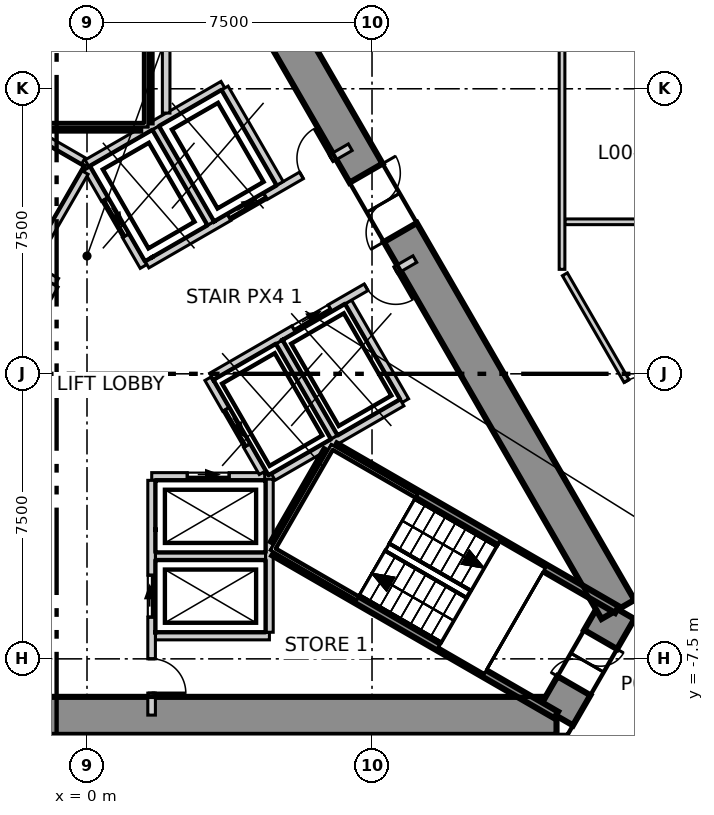
"""IFC4 building model, lengths in metres.
Left out: names, types, materials, properties, quantities, classifications, styles, units other than length and angle.
Written with IfcOpenShell. Run it as: python <this file> out.ifc"""

import sys

from ifc_helpers import new_model, si_unit, direction, frame, frame_2d, origin, place, context, subcontext, project, spatial, polyline, rectangle, outline, extrude, element, fill, save


model = new_model("IFC4")
c1 = context("Model", 3, precision=1e-05, world=origin(), true_north=direction((0.0, 1.0)))
c2 = subcontext(c1, "Body", "Model", "MODEL_VIEW")
j1 = project(units=[si_unit("LENGTHUNIT", "METRE"), si_unit("PLANEANGLEUNIT", "RADIAN")], contexts=[c1])
p1 = place(None, origin())
s1 = spatial("IfcSite", under=j1, at=p1, CompositionType="ELEMENT")
p2 = place(p1, origin())
s2 = spatial("IfcBuilding", under=s1, at=p2, CompositionType="ELEMENT")
p3 = place(p2, origin())
s3 = spatial("IfcBuildingStorey", under=s2, at=p3, CompositionType="ELEMENT", Elevation=0.0)
p4 = place(p3, frame((-12.355, -9.0, -0.4), z_axis=(0.0, 0.0, 1.0), x_axis=(1.0, 0.0, 0.0)))
e1 = element("IfcWall", 1, at=p4, inside=s3, PredefinedType="SHEAR", context=c2, shape_type="SweptSolid", body=[
    extrude(outline(polyline([(-0.289, -0.5), (1.656, -0.5), (3.601, -0.5), (5.547, -0.5), (7.492, -0.5), (9.437, -0.5), (11.382, -0.5), (13.328, -0.5), (15.273, -0.5), (17.218, -0.5), (19.163, -0.5), (21.109, -0.5), (23.054, -0.5), (24.999, -0.5), (24.422, 0.5), (22.566, 0.5), (20.709, 0.5), (18.853, 0.5), (16.996, 0.5), (15.14, 0.5), (13.283, 0.5), (11.427, 0.5), (9.57, 0.5), (7.714, 0.5), (5.857, 0.5), (4.001, 0.5), (2.145, 0.5), (0.288, 0.5), (-0.289, -0.5)])), origin(), (0.0, 0.0, 1.0), 8.5),
])
p5 = place(p3, frame((12.355, -9.0, -0.4), z_axis=(0.0, 0.0, 1.0), x_axis=(0.500077567175, 0.865980615723, 0.0)))
e2 = element("IfcWall", 2, at=p5, inside=s3, PredefinedType="SHEAR", context=c2, shape_type="SweptSolid", body=[
    extrude(outline(polyline([(-0.288, -0.5), (1.617, -0.5), (3.522, -0.5), (2.945, 0.5), (1.617, 0.5), (0.289, 0.499), (-0.288, -0.5)])), origin(), (0.0, 0.0, 1.0), 8.5),
])
p6 = place(p5, frame((0.917, 0.0, 0.4)))
e3 = element("IfcOpeningElement", 3, at=p6, cuts=e2, PredefinedType="OPENING", context=c2, shape_type="SweptSolid", body=[
    extrude(rectangle(XDim=1.4, YDim=2.1, at=frame_2d((0.7, 1.05))), frame((0.0, 0.51, 0.0), z_axis=(0.0, -1.0, 0.0), x_axis=(1.0, 0.0, 0.0)), (0.0, 0.0, 1.0), 1.02),
])
p7 = place(p3, frame((13.972, -6.2, -0.4), z_axis=(0.0, 0.0, 1.0), x_axis=(-0.499992141631, 0.866029940768, 0.0)))
e4 = element("IfcWall", 4, at=p7, inside=s3, PredefinedType="SHEAR", context=c2, shape_type="SweptSolid", body=[
    extrude(outline(polyline([(-0.288, -0.5), (1.657, -0.5), (3.602, -0.5), (5.547, -0.5), (7.493, -0.5), (9.438, -0.5), (11.383, -0.5), (13.328, -0.5), (15.273, -0.5), (17.218, -0.499), (19.164, -0.499), (21.109, -0.499), (23.054, -0.499), (24.999, -0.499), (24.422, 0.5), (22.566, 0.5), (20.709, 0.5), (18.853, 0.5), (16.996, 0.5), (15.14, 0.5), (13.283, 0.5), (11.427, 0.5), (9.57, 0.5), (7.714, 0.5), (5.857, 0.5), (4.001, 0.5), (2.145, 0.5), (0.288, 0.5), (-0.288, -0.5)])), origin(), (0.0, 0.0, 1.0), 8.5),
])
p8 = place(p7, frame((11.455, 0.0, 0.4)))
e5 = element("IfcOpeningElement", 5, at=p8, cuts=e4, PredefinedType="OPENING", context=c2, shape_type="SweptSolid", body=[
    extrude(rectangle(XDim=1.8, YDim=2.1, at=frame_2d((0.9, 1.05))), frame((0.0, 0.51, 0.0), z_axis=(0.0, -1.0, 0.0), x_axis=(1.0, 0.0, 0.0)), (0.0, 0.0, 1.0), 1.02),
])
p9 = place(p3, frame((12.575, 4.0, 0.0), z_axis=(0.0, 0.0, 1.0), x_axis=(1.0, 0.0, 0.0)))
e6 = element("IfcWall", 6, at=p9, inside=s3, PredefinedType="PARTITIONING", context=c2, shape_type="SweptSolid", body=[
    extrude(rectangle(XDim=5.583, YDim=0.15, at=frame_2d((2.792, 0.0))), origin(), (0.0, 0.0, 1.0), 8.1),
])
p10 = place(p3, frame((12.5, 2.749, 0.0), z_axis=(0.0, 0.0, 1.0), x_axis=(0.0, 1.0, 0.0)))
e7 = element("IfcWall", 7, at=p10, inside=s3, PredefinedType="PARTITIONING", context=c2, shape_type="SweptSolid", body=[
    extrude(rectangle(XDim=11.2, YDim=0.15, at=frame_2d((5.6, 0.0))), origin(), (0.0, 0.0, 1.0), 8.1),
])
p11 = place(p3, frame((13.625, 12.0, 0.0), z_axis=(0.0, 0.0, 1.0), x_axis=(0.500026956598, -0.866009839826, 0.0)))
e8 = element("IfcWall", 8, at=p11, inside=s3, PredefinedType="PARTITIONING", context=c2, shape_type="SweptSolid", body=[
    extrude(rectangle(XDim=16.749, YDim=0.15, at=frame_2d((8.375, 0.0))), origin(), (0.0, 0.0, 1.0), 8.1),
])
p12 = place(p11, frame((4.119, 0.0, 0.0)))
e9 = element("IfcOpeningElement", 9, at=p12, cuts=e8, PredefinedType="OPENING", context=c2, shape_type="SweptSolid", body=[
    extrude(rectangle(XDim=1.0, YDim=2.1, at=frame_2d((0.5, 1.05))), frame((0.0, 0.085, 0.0), z_axis=(0.0, -1.0, 0.0), x_axis=(1.0, 0.0, 0.0)), (0.0, 0.0, 1.0), 0.17),
])
p13 = place(p3, frame((12.575, 2.619, 0.0), z_axis=(0.0, 0.0, 1.0), x_axis=(0.499992812315, -0.866029553557, 0.0)))
e10 = element("IfcWall", 10, at=p13, inside=s3, PredefinedType="PARTITIONING", context=c2, shape_type="SweptSolid", body=[
    extrude(rectangle(XDim=7.556, YDim=0.15, at=frame_2d((3.778, 0.0))), origin(), (0.0, 0.0, 1.0), 8.1),
])
p14 = place(p13, frame((3.246, 0.0, 0.0)))
e11 = element("IfcOpeningElement", 11, at=p14, cuts=e10, PredefinedType="OPENING", context=c2, shape_type="SweptSolid", body=[
    extrude(rectangle(XDim=1.0, YDim=2.1, at=frame_2d((0.5, 1.05))), frame((0.0, 0.085, 0.0), z_axis=(0.0, -1.0, 0.0), x_axis=(1.0, 0.0, 0.0)), (0.0, 0.0, 1.0), 0.17),
])
p15 = place(p3, frame((1.8, -6.9, 0.0), z_axis=(0.0, 0.0, 1.0), x_axis=(1.0, 0.0, 0.0)))
e12 = element("IfcWall", 12, at=p15, inside=s3, PredefinedType="SOLIDWALL", context=c2, shape_type="SweptSolid", body=[
    extrude(rectangle(XDim=3.0, YDim=0.2, at=frame_2d((1.5, 0.0))), origin(), (0.0, 0.0, 1.0), 8.1),
])
p16 = place(p3, frame((1.8, -4.8, 0.0), z_axis=(0.0, 0.0, 1.0), x_axis=(1.0, 0.0, 0.0)))
e13 = element("IfcWall", 13, at=p16, inside=s3, PredefinedType="SOLIDWALL", context=c2, shape_type="SweptSolid", body=[
    extrude(rectangle(XDim=2.9, YDim=0.2, at=frame_2d((1.45, 0.0))), origin(), (0.0, 0.0, 1.0), 8.1),
])
p17 = place(p3, frame((1.703, -2.7, 0.0), z_axis=(0.0, 0.0, 1.0), x_axis=(1.0, 0.0, 0.0)))
e14 = element("IfcWall", 14, at=p17, inside=s3, PredefinedType="SOLIDWALL", context=c2, shape_type="SweptSolid", body=[
    extrude(rectangle(XDim=2.973, YDim=0.2, at=frame_2d((1.487, 0.0))), origin(), (0.0, 0.0, 1.0), 8.1),
])
p18 = place(p17, frame((0.936, 0.0, 0.0)))
e15 = element("IfcOpeningElement", 15, at=p18, cuts=e14, PredefinedType="OPENING", context=c2, shape_type="SweptSolid", body=[
    extrude(rectangle(XDim=1.1, YDim=2.1, at=frame_2d((0.55, 1.05))), frame((0.0, 0.11, 0.0), z_axis=(0.0, -1.0, 0.0), x_axis=(1.0, 0.0, 0.0)), (0.0, 0.0, 1.0), 0.22),
])
p19 = place(p3, frame((-0.002, 5.541, 0.0), z_axis=(0.0, 0.0, 1.0), x_axis=(0.86600155993, 0.500041296494, 0.0)))
e16 = element("IfcWall", 16, at=p19, inside=s3, PredefinedType="SOLIDWALL", context=c2, shape_type="SweptSolid", body=[
    extrude(rectangle(XDim=4.132, YDim=0.2, at=frame_2d((2.066, 0.0))), origin(), (0.0, 0.0, 1.0), 8.1),
])
p20 = place(p3, frame((0.0, 5.4, 0.0), z_axis=(0.0, 0.0, 1.0), x_axis=(0.500103862429, -0.865965430478, 0.0)))
e17 = element("IfcWall", 17, at=p20, inside=s3, PredefinedType="SOLIDWALL", context=c2, shape_type="SweptSolid", body=[
    extrude(rectangle(XDim=2.973, YDim=0.2, at=frame_2d((1.487, 0.0))), origin(), (0.0, 0.0, 1.0), 8.1),
])
p21 = place(p20, frame((0.937, 0.0, 0.0)))
e18 = element("IfcOpeningElement", 18, at=p21, cuts=e17, PredefinedType="OPENING", context=c2, shape_type="SweptSolid", body=[
    extrude(rectangle(XDim=1.1, YDim=2.1, at=frame_2d((0.55, 1.05))), frame((0.0, 0.11, 0.0), z_axis=(0.0, -1.0, 0.0), x_axis=(1.0, 0.0, 0.0)), (0.0, 0.0, 1.0), 0.22),
])
p22 = place(p3, frame((3.19, -0.125, 0.0), z_axis=(0.0, 0.0, 1.0), x_axis=(0.499988658015, -0.866031951983, 0.0)))
e19 = element("IfcWall", 19, at=p22, inside=s3, PredefinedType="SOLIDWALL", context=c2, shape_type="SweptSolid", body=[
    extrude(rectangle(XDim=2.858, YDim=0.2, at=frame_2d((1.429, 0.0))), origin(), (0.0, 0.0, 1.0), 8.1),
])
p23 = place(p22, frame((0.936, 0.0, 0.0)))
e20 = element("IfcOpeningElement", 20, at=p23, cuts=e19, PredefinedType="OPENING", context=c2, shape_type="SweptSolid", body=[
    extrude(rectangle(XDim=1.1, YDim=2.1, at=frame_2d((0.55, 1.05))), frame((0.0, 0.11, 0.0), z_axis=(0.0, -1.0, 0.0), x_axis=(1.0, 0.0, 0.0)), (0.0, 0.0, 1.0), 0.22),
])
p24 = place(p3, frame((1.578, 2.874, 0.0), z_axis=(0.0, 0.0, 1.0), x_axis=(0.866055259465, 0.499948284879, 0.0)))
e21 = element("IfcWall", 21, at=p24, inside=s3, PredefinedType="SOLIDWALL", context=c2, shape_type="SweptSolid", body=[
    extrude(rectangle(XDim=6.177, YDim=0.2, at=frame_2d((3.088, 0.0))), origin(), (0.0, 0.0, 1.0), 8.1),
])
p25 = place(p24, frame((2.496, 0.0, 0.0)))
e22 = element("IfcOpeningElement", 22, at=p25, cuts=e21, PredefinedType="OPENING", context=c2, shape_type="SweptSolid", body=[
    extrude(rectangle(XDim=1.1, YDim=2.1, at=frame_2d((0.55, 1.05))), frame((0.0, 0.11, 0.0), z_axis=(0.0, -1.0, 0.0), x_axis=(1.0, 0.0, 0.0)), (0.0, 0.0, 1.0), 0.22),
])
p26 = place(p24, frame((4.696, 0.0, 0.0)))
e23 = element("IfcOpeningElement", 23, at=p26, cuts=e21, PredefinedType="OPENING", context=c2, shape_type="SweptSolid", body=[
    extrude(rectangle(XDim=0.9, YDim=2.1, at=frame_2d((0.45, 1.05))), frame((0.0, 0.11, 0.0), z_axis=(0.0, -1.0, 0.0), x_axis=(1.0, 0.0, 0.0)), (0.0, 0.0, 1.0), 0.22),
])
p27 = place(p3, frame((1.7, -8.98, 0.0), z_axis=(0.0, 0.0, 1.0), x_axis=(0.0, 1.0, 0.0)))
e24 = element("IfcWall", 24, at=p27, inside=s3, PredefinedType="SOLIDWALL", context=c2, shape_type="SweptSolid", body=[
    extrude(rectangle(XDim=6.177, YDim=0.2, at=frame_2d((3.088, 0.0))), origin(), (0.0, 0.0, 1.0), 8.1),
])
p28 = place(p27, frame((2.58, 0.0, 0.0)))
e25 = element("IfcOpeningElement", 25, at=p28, cuts=e24, PredefinedType="OPENING", context=c2, shape_type="SweptSolid", body=[
    extrude(rectangle(XDim=1.1, YDim=2.1, at=frame_2d((0.55, 1.05))), frame((0.0, 0.11, 0.0), z_axis=(0.0, -1.0, 0.0), x_axis=(1.0, 0.0, 0.0)), (0.0, 0.0, 1.0), 0.22),
])
p29 = place(p27, frame((0.58, 0.0, 0.0)))
e26 = element("IfcOpeningElement", 26, at=p29, cuts=e24, PredefinedType="OPENING", context=c2, shape_type="SweptSolid", body=[
    extrude(rectangle(XDim=0.9, YDim=2.1, at=frame_2d((0.45, 1.05))), frame((0.0, 0.11, 0.0), z_axis=(0.0, -1.0, 0.0), x_axis=(1.0, 0.0, 0.0)), (0.0, 0.0, 1.0), 0.22),
])
p30 = place(p3, frame((4.8, -6.8, 0.0), z_axis=(0.0, 0.0, 1.0), x_axis=(0.0, 1.0, 0.0)))
e27 = element("IfcWall", 27, at=p30, inside=s3, PredefinedType="SOLIDWALL", context=c2, shape_type="SweptSolid", body=[
    extrude(rectangle(XDim=4.029, YDim=0.2, at=frame_2d((2.015, 0.0))), origin(), (0.0, 0.0, 1.0), 8.1),
])
for number, where, z_axis, x_axis in (
    (28, (1.807, 6.47, 0.0), (0.0, 0.0, 1.0), (0.5, -0.866, 0.0)),
    (29, (5.057, 0.841, 0.0), (0.0, 0.0, 1.0), (0.5, -0.866, 0.0)),
    (30, (3.626, 7.52, 0.0), (0.0, 0.0, 1.0), (0.5, -0.866, 0.0)),
):
    element("IfcWall", number, at=place(p3, frame(where, z_axis=z_axis, x_axis=x_axis)), inside=s3, PredefinedType="SOLIDWALL", context=c2, shape_type="SweptSolid", body=[
        extrude(rectangle(XDim=2.9, YDim=0.2, at=frame_2d((1.45, 0.0))), origin(), (0.0, 0.0, 1.0), 8.1),
    ])
p31 = place(p3, frame((6.876, 1.891, 0.0), z_axis=(0.0, 0.0, 1.0), x_axis=(0.499990139034, -0.866031096941, 0.0)))
e31 = element("IfcWall", 31, at=p31, inside=s3, PredefinedType="SOLIDWALL", context=c2, shape_type="SweptSolid", body=[
    extrude(rectangle(XDim=3.0, YDim=0.2, at=frame_2d((1.5, 0.0))), origin(), (0.0, 0.0, 1.0), 8.1),
])
p32 = place(p3, frame((3.278, -0.071, 0.0), z_axis=(0.0, 0.0, 1.0), x_axis=(0.865959795517, 0.500113619639, 0.0)))
e32 = element("IfcWall", 32, at=p32, inside=s3, PredefinedType="SOLIDWALL", context=c2, shape_type="SweptSolid", body=[
    extrude(rectangle(XDim=6.177, YDim=0.2, at=frame_2d((3.088, 0.0))), origin(), (0.0, 0.0, 1.0), 8.1),
])
p33 = place(p32, frame((2.497, 0.0, 0.0)))
e33 = element("IfcOpeningElement", 33, at=p33, cuts=e32, PredefinedType="OPENING", context=c2, shape_type="SweptSolid", body=[
    extrude(rectangle(XDim=1.1, YDim=2.1, at=frame_2d((0.55, 1.05))), frame((0.0, 0.11, 0.0), z_axis=(0.0, -1.0, 0.0), x_axis=(1.0, 0.0, 0.0)), (0.0, 0.0, 1.0), 0.22),
])
p34 = place(p32, frame((4.697, 0.0, 0.0)))
e34 = element("IfcOpeningElement", 34, at=p34, cuts=e32, PredefinedType="OPENING", context=c2, shape_type="SweptSolid", body=[
    extrude(rectangle(XDim=0.9, YDim=2.1, at=frame_2d((0.45, 1.05))), frame((0.0, 0.11, 0.0), z_axis=(0.0, -1.0, 0.0), x_axis=(1.0, 0.0, 0.0)), (0.0, 0.0, 1.0), 0.22),
])
p35 = place(p3, frame((4.9, -2.714, 0.0), z_axis=(0.0, 0.0, 1.0), x_axis=(0.865992350556, 0.500057245502, 0.0)))
e35 = element("IfcWall", 35, at=p35, inside=s3, PredefinedType="SOLIDWALL", context=c2, shape_type="SweptSolid", body=[
    extrude(rectangle(XDim=3.914, YDim=0.2, at=frame_2d((1.957, 0.0))), origin(), (0.0, 0.0, 1.0), 8.1),
])
p36 = place(p3, frame((-1.488, 2.822, 0.0), z_axis=(0.0, 0.0, 1.0), x_axis=(0.866236612152, -0.499633997809, 0.0)))
e36 = element("IfcWall", 36, at=p36, inside=s3, PredefinedType="SOLIDWALL", context=c2, shape_type="SweptSolid", body=[
    extrude(rectangle(XDim=0.796, YDim=0.2, at=frame_2d((0.398, 0.0))), origin(), (0.0, 0.0, 1.0), 8.1),
])
p37 = place(p3, frame((-2.444, -0.433, 0.0), z_axis=(0.0, 0.0, 1.0), x_axis=(0.500035624827, 0.866004834804, 0.0)))
e37 = element("IfcWall", 37, at=p37, inside=s3, PredefinedType="SOLIDWALL", context=c2, shape_type="SweptSolid", body=[
    extrude(rectangle(XDim=3.194, YDim=0.2, at=frame_2d((1.597, 0.0))), origin(), (0.0, 0.0, 1.0), 8.1),
])
p38 = place(p3, frame((-1.67, 6.507, 0.0), z_axis=(0.0, 0.0, 1.0), x_axis=(0.865941441609, -0.500145398563, 0.0)))
e38 = element("IfcWall", 38, at=p38, inside=s3, PredefinedType="SOLIDWALL", context=c2, shape_type="SweptSolid", body=[
    extrude(rectangle(XDim=1.815, YDim=0.2, at=frame_2d((0.908, 0.0))), origin(), (0.0, 0.0, 1.0), 8.1),
])
p39 = place(p3, frame((-1.438, 2.909, 0.0), z_axis=(0.0, 0.0, 1.0), x_axis=(0.499829630636, 0.866123744241, 0.0)))
e39 = element("IfcWall", 39, at=p39, inside=s3, PredefinedType="SOLIDWALL", context=c2, shape_type="SweptSolid", body=[
    extrude(rectangle(XDim=2.761, YDim=0.2, at=frame_2d((1.38, 0.0))), origin(), (0.0, 0.0, 1.0), 8.1),
])
p40 = place(p3, frame((2.083, 6.861, 0.0), z_axis=(0.0, 0.0, 1.0), x_axis=(0.0, 1.0, 0.0)))
e40 = element("IfcWall", 40, at=p40, inside=s3, PredefinedType="SOLIDWALL", context=c2, shape_type="SweptSolid", body=[
    extrude(rectangle(XDim=7.491, YDim=0.2, at=frame_2d((3.746, 0.0))), origin(), (0.0, 0.0, 1.0), 8.1),
])
p41 = place(p3, frame((1.6, 6.615, 0.0), z_axis=(0.0, 0.0, 1.0), x_axis=(0.0, 1.0, 0.0)))
e41 = element("IfcWall", 41, at=p41, inside=s3, PredefinedType="SOLIDWALL", context=c2, shape_type="SweptSolid", body=[
    extrude(rectangle(XDim=8.565, YDim=0.2, at=frame_2d((4.282, 0.0))), origin(), (0.0, 0.0, 1.0), 8.1),
])
p42 = place(p3, frame((-1.4, 6.5, 0.0), z_axis=(0.0, 0.0, 1.0), x_axis=(1.0, 0.0, 0.0)))
e42 = element("IfcWall", 42, at=p42, inside=s3, PredefinedType="SOLIDWALL", context=c2, shape_type="SweptSolid", body=[
    extrude(rectangle(XDim=2.8, YDim=0.2, at=frame_2d((1.4, 0.0))), origin(), (0.0, 0.0, 1.0), 8.1),
])
p43 = place(p3, frame((4.929, -4.462, 0.0), z_axis=(0.0, 0.0, 1.0), x_axis=(0.500200581029, 0.865909567298, 0.0)))
e43 = element("IfcWall", 43, at=p43, inside=s3, PredefinedType="SOLIDWALL", context=c2, shape_type="SweptSolid", body=[
    extrude(rectangle(XDim=2.799, YDim=0.2, at=frame_2d((1.399, 0.0))), origin(), (0.0, 0.0, 1.0), 8.1),
])
p44 = place(p3, frame((6.529, -1.922, 0.0), z_axis=(0.0, 0.0, 1.0), x_axis=(0.866036527536, -0.499980732602, 0.0)))
e44 = element("IfcWall", 44, at=p44, inside=s3, PredefinedType="SOLIDWALL", context=c2, shape_type="SweptSolid", body=[
    extrude(rectangle(XDim=8.564, YDim=0.2, at=frame_2d((4.282, 0.0))), origin(), (0.0, 0.0, 1.0), 8.1),
])
p45 = place(p3, frame((4.929, -4.693, 0.0), z_axis=(0.0, 0.0, 1.0), x_axis=(0.865987152174, -0.50006624788, 0.0)))
e45 = element("IfcWall", 45, at=p45, inside=s3, PredefinedType="SOLIDWALL", context=c2, shape_type="SweptSolid", body=[
    extrude(rectangle(XDim=8.565, YDim=0.2, at=frame_2d((4.282, 0.0))), origin(), (0.0, 0.0, 1.0), 8.1),
])
p46 = place(p18, origin())
e46 = element("IfcDoor", 46, at=p46, inside=s3, OperationType="SLIDING_TO_LEFT", PredefinedType="DOOR", context=c2, shape_type="SweptSolid", body=[
    extrude(rectangle(XDim=1.1, YDim=2.1, at=frame_2d((0.55, 1.05))), frame((0.0, 0.025, 0.0), z_axis=(0.0, -1.0, 0.0), x_axis=(1.0, 0.0, 0.0)), (0.0, 0.0, 1.0), 0.05),
])
fill(e15, e46)
p47 = place(p28, origin())
e47 = element("IfcDoor", 47, at=p47, inside=s3, OperationType="SLIDING_TO_LEFT", PredefinedType="DOOR", context=c2, shape_type="SweptSolid", body=[
    extrude(rectangle(XDim=1.1, YDim=2.1, at=frame_2d((0.55, 1.05))), frame((0.0, 0.025, 0.0), z_axis=(0.0, -1.0, 0.0), x_axis=(1.0, 0.0, 0.0)), (0.0, 0.0, 1.0), 0.05),
])
fill(e25, e47)
p48 = place(p21, origin())
e48 = element("IfcDoor", 48, at=p48, inside=s3, OperationType="SLIDING_TO_LEFT", PredefinedType="DOOR", context=c2, shape_type="SweptSolid", body=[
    extrude(rectangle(XDim=1.1, YDim=2.1, at=frame_2d((0.55, 1.05))), frame((0.0, 0.025, 0.0), z_axis=(0.0, -1.0, 0.0), x_axis=(1.0, 0.0, 0.0)), (0.0, 0.0, 1.0), 0.05),
])
fill(e18, e48)
p49 = place(p25, origin())
e49 = element("IfcDoor", 49, at=p49, inside=s3, OperationType="SLIDING_TO_LEFT", PredefinedType="DOOR", context=c2, shape_type="SweptSolid", body=[
    extrude(rectangle(XDim=1.1, YDim=2.1, at=frame_2d((0.55, 1.05))), frame((0.0, 0.025, 0.0), z_axis=(0.0, -1.0, 0.0), x_axis=(1.0, 0.0, 0.0)), (0.0, 0.0, 1.0), 0.05),
])
fill(e22, e49)
p50 = place(p23, origin())
e50 = element("IfcDoor", 50, at=p50, inside=s3, OperationType="SLIDING_TO_LEFT", PredefinedType="DOOR", context=c2, shape_type="SweptSolid", body=[
    extrude(rectangle(XDim=1.1, YDim=2.1, at=frame_2d((0.55, 1.05))), frame((0.0, 0.025, 0.0), z_axis=(0.0, -1.0, 0.0), x_axis=(1.0, 0.0, 0.0)), (0.0, 0.0, 1.0), 0.05),
])
fill(e20, e50)
p51 = place(p33, origin())
e51 = element("IfcDoor", 51, at=p51, inside=s3, OperationType="SLIDING_TO_LEFT", PredefinedType="DOOR", context=c2, shape_type="SweptSolid", body=[
    extrude(rectangle(XDim=1.1, YDim=2.1, at=frame_2d((0.55, 1.05))), frame((0.0, 0.025, 0.0), z_axis=(0.0, -1.0, 0.0), x_axis=(1.0, 0.0, 0.0)), (0.0, 0.0, 1.0), 0.05),
])
fill(e33, e51)
p52 = place(p14, origin())
e52 = element("IfcDoor", 52, at=p52, inside=s3, OperationType="SINGLE_SWING_LEFT", PredefinedType="DOOR", context=c2, shape_type="SweptSolid", body=[
    extrude(rectangle(XDim=1.0, YDim=2.1, at=frame_2d((0.5, 1.05))), frame((0.0, 0.025, 0.0), z_axis=(0.0, -1.0, 0.0), x_axis=(1.0, 0.0, 0.0)), (0.0, 0.0, 1.0), 0.05),
])
fill(e11, e52)
p53 = place(p8, origin())
e53 = element("IfcDoor", 53, at=p53, inside=s3, OperationType="DOUBLE_DOOR_SINGLE_SWING", PredefinedType="DOOR", context=c2, shape_type="SweptSolid", body=[
    extrude(rectangle(XDim=1.8, YDim=2.1, at=frame_2d((0.9, 1.05))), frame((0.0, 0.025, 0.0), z_axis=(0.0, -1.0, 0.0), x_axis=(1.0, 0.0, 0.0)), (0.0, 0.0, 1.0), 0.05),
])
fill(e5, e53)
p54 = place(p6, origin())
e54 = element("IfcDoor", 54, at=p54, inside=s3, OperationType="DOUBLE_DOOR_SINGLE_SWING", PredefinedType="DOOR", context=c2, shape_type="SweptSolid", body=[
    extrude(rectangle(XDim=1.4, YDim=2.1, at=frame_2d((0.7, 1.05))), frame((0.0, 0.025, 0.0), z_axis=(0.0, -1.0, 0.0), x_axis=(1.0, 0.0, 0.0)), (0.0, 0.0, 1.0), 0.05),
])
fill(e3, e54)
p55 = place(p26, origin())
e55 = element("IfcDoor", 55, at=p55, inside=s3, OperationType="SINGLE_SWING_LEFT", PredefinedType="DOOR", context=c2, shape_type="SweptSolid", body=[
    extrude(rectangle(XDim=0.9, YDim=2.1, at=frame_2d((0.45, 1.05))), frame((0.0, 0.025, 0.0), z_axis=(0.0, -1.0, 0.0), x_axis=(1.0, 0.0, 0.0)), (0.0, 0.0, 1.0), 0.05),
])
fill(e23, e55)
p56 = place(p29, origin())
e56 = element("IfcDoor", 56, at=p56, inside=s3, OperationType="SINGLE_SWING_LEFT", PredefinedType="DOOR", context=c2, shape_type="SweptSolid", body=[
    extrude(rectangle(XDim=0.9, YDim=2.1, at=frame_2d((0.45, 1.05))), frame((0.0, 0.025, 0.0), z_axis=(0.0, -1.0, 0.0), x_axis=(1.0, 0.0, 0.0)), (0.0, 0.0, 1.0), 0.05),
])
fill(e26, e56)
p57 = place(p34, origin())
e57 = element("IfcDoor", 57, at=p57, inside=s3, OperationType="SINGLE_SWING_RIGHT", PredefinedType="DOOR", context=c2, shape_type="SweptSolid", body=[
    extrude(rectangle(XDim=0.9, YDim=2.1, at=frame_2d((0.45, 1.05))), frame((0.0, 0.025, 0.0), z_axis=(0.0, -1.0, 0.0), x_axis=(1.0, 0.0, 0.0)), (0.0, 0.0, 1.0), 0.05),
])
fill(e34, e57)
save(model, sys.argv[1])
